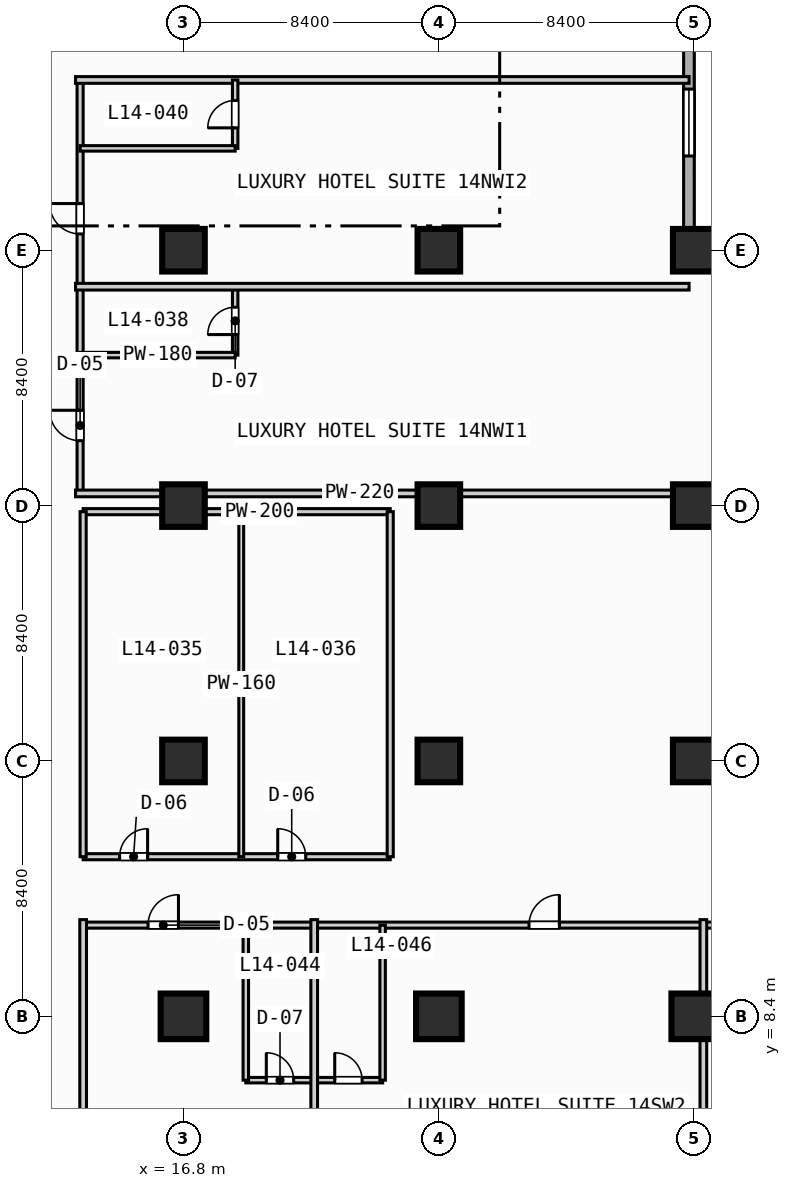
"""IFC4 building model, lengths in metres.
Left out: names, types, materials, properties, quantities, classifications, styles, units other than length and angle.
Written with IfcOpenShell. Run it as: python <this file> out.ifc"""

import sys

from ifc_helpers import new_model, si_unit, direction, frame, frame_2d, origin, origin_2d, place, context, subcontext, project, spatial, rectangle, extrude, element, fill, save


model = new_model("IFC4")
c1 = context("Model", 3, precision=1e-05, world=origin(), true_north=direction((0.0, 1.0)))
c2 = subcontext(c1, "Body", "Model", "MODEL_VIEW")
j1 = project(units=[si_unit("LENGTHUNIT", "METRE"), si_unit("PLANEANGLEUNIT", "RADIAN")], contexts=[c1])
p1 = place(None, origin())
s1 = spatial("IfcSite", under=j1, at=p1, CompositionType="ELEMENT")
p2 = place(p1, origin())
s2 = spatial("IfcBuilding", under=s1, at=p2, CompositionType="ELEMENT")
p3 = place(p2, frame((0.0, 0.0, 62.4)))
s3 = spatial("IfcBuildingStorey", under=s2, at=p3, CompositionType="ELEMENT", Elevation=62.4)
p4 = place(p3, frame((16.8, 8.4, 0.0), z_axis=(0.0, 0.0, 1.0), x_axis=(1.0, 0.0, 0.0)))
e1 = element("IfcColumn", 1, at=p4, inside=s3, PredefinedType="COLUMN", context=c2, shape_type="SweptSolid", body=[
    extrude(rectangle(XDim=1.5, YDim=1.5, at=origin_2d()), origin(), (0.0, 0.0, 1.0), 3.8),
])
for number, where, z_axis, x_axis in (
    (2, (16.8, 16.8, 0.0), (0.0, 0.0, 1.0), (1.0, 0.0, 0.0)),
    (3, (16.8, 25.2, 0.0), (0.0, 0.0, 1.0), (1.0, 0.0, 0.0)),
    (4, (16.8, 33.6, 0.0), (0.0, 0.0, 1.0), (1.0, 0.0, 0.0)),
):
    element("IfcColumn", number, at=place(p3, frame(where, z_axis=z_axis, x_axis=x_axis)), inside=s3, PredefinedType="COLUMN", context=c2, shape_type="SweptSolid", body=[
        extrude(rectangle(XDim=1.4, YDim=1.4, at=origin_2d()), origin(), (0.0, 0.0, 1.0), 3.8),
    ])
p5 = place(p3, frame((25.2, 8.4, 0.0), z_axis=(0.0, 0.0, 1.0), x_axis=(1.0, 0.0, 0.0)))
e5 = element("IfcColumn", 5, at=p5, inside=s3, PredefinedType="COLUMN", context=c2, shape_type="SweptSolid", body=[
    extrude(rectangle(XDim=1.5, YDim=1.5, at=origin_2d()), origin(), (0.0, 0.0, 1.0), 3.8),
])
for number, where, z_axis, x_axis in (
    (6, (25.2, 16.8, 0.0), (0.0, 0.0, 1.0), (1.0, 0.0, 0.0)),
    (7, (25.2, 25.2, 0.0), (0.0, 0.0, 1.0), (1.0, 0.0, 0.0)),
    (8, (25.2, 33.6, 0.0), (0.0, 0.0, 1.0), (1.0, 0.0, 0.0)),
):
    element("IfcColumn", number, at=place(p3, frame(where, z_axis=z_axis, x_axis=x_axis)), inside=s3, PredefinedType="COLUMN", context=c2, shape_type="SweptSolid", body=[
        extrude(rectangle(XDim=1.4, YDim=1.4, at=origin_2d()), origin(), (0.0, 0.0, 1.0), 3.8),
    ])
p6 = place(p3, frame((33.6, 8.4, 0.0), z_axis=(0.0, 0.0, 1.0), x_axis=(1.0, 0.0, 0.0)))
e9 = element("IfcColumn", 9, at=p6, inside=s3, PredefinedType="COLUMN", context=c2, shape_type="SweptSolid", body=[
    extrude(rectangle(XDim=1.5, YDim=1.5, at=origin_2d()), origin(), (0.0, 0.0, 1.0), 3.8),
])
for number, where, z_axis, x_axis in (
    (10, (33.6, 16.8, 0.0), (0.0, 0.0, 1.0), (1.0, 0.0, 0.0)),
    (11, (33.6, 25.2, 0.0), (0.0, 0.0, 1.0), (1.0, 0.0, 0.0)),
    (12, (33.6, 33.6, 0.0), (0.0, 0.0, 1.0), (1.0, 0.0, 0.0)),
):
    element("IfcColumn", number, at=place(p3, frame(where, z_axis=z_axis, x_axis=x_axis)), inside=s3, PredefinedType="COLUMN", context=c2, shape_type="SweptSolid", body=[
        extrude(rectangle(XDim=1.4, YDim=1.4, at=origin_2d()), origin(), (0.0, 0.0, 1.0), 3.8),
    ])
p7 = place(p3, frame((33.425, 89.225, 0.0), z_axis=(0.0, 0.0, 1.0), x_axis=(0.0, -1.0, 0.0)))
e13 = element("IfcWall", 13, at=p7, inside=s3, PredefinedType="STANDARD", context=c2, shape_type="SweptSolid", body=[
    extrude(rectangle(XDim=55.8, YDim=0.35, at=frame_2d((27.9, 0.0))), origin(), (0.0, 0.0, 1.0), 3.55),
])
p8 = place(p7, frame((50.325, 0.0, 0.85)))
e14 = element("IfcOpeningElement", 14, at=p8, cuts=e13, PredefinedType="OPENING", context=c2, shape_type="SweptSolid", body=[
    extrude(rectangle(XDim=2.2, YDim=1.8, at=frame_2d((1.1, 0.9))), frame((0.0, 0.185, 0.0), z_axis=(0.0, -1.0, 0.0), x_axis=(1.0, 0.0, 0.0)), (0.0, 0.0, 1.0), 0.37),
])
p9 = place(p3, frame((33.425, 33.425, 0.0), z_axis=(0.0, 0.0, 1.0), x_axis=(1.0, 0.0, 0.0)))
e15 = element("IfcWall", 15, at=p9, inside=s3, PredefinedType="STANDARD", context=c2, shape_type="SweptSolid", body=[
    extrude(rectangle(XDim=55.8, YDim=0.35, at=frame_2d((27.9, 0.0))), origin(), (0.0, 0.0, 1.0), 3.55),
])
p10 = place(p9, frame((12.075, 0.0, 0.0)))
e16 = element("IfcOpeningElement", 16, at=p10, cuts=e15, PredefinedType="OPENING", context=c2, shape_type="SweptSolid", body=[
    extrude(rectangle(XDim=1.4, YDim=2.2, at=frame_2d((0.7, 1.1))), frame((0.0, 0.185, 0.0), z_axis=(0.0, -1.0, 0.0), x_axis=(1.0, 0.0, 0.0)), (0.0, 0.0, 1.0), 0.37),
])
p11 = place(p9, frame((36.875, 0.0, 0.85)))
e17 = element("IfcOpeningElement", 17, at=p11, cuts=e15, PredefinedType="OPENING", context=c2, shape_type="SweptSolid", body=[
    extrude(rectangle(XDim=2.2, YDim=1.8, at=frame_2d((1.1, 0.9))), frame((0.0, 0.185, 0.0), z_axis=(0.0, -1.0, 0.0), x_axis=(1.0, 0.0, 0.0)), (0.0, 0.0, 1.0), 0.37),
])
p12 = place(p9, frame((45.275, 0.0, 0.85)))
e18 = element("IfcOpeningElement", 18, at=p12, cuts=e15, PredefinedType="OPENING", context=c2, shape_type="SweptSolid", body=[
    extrude(rectangle(XDim=2.2, YDim=1.8, at=frame_2d((1.1, 0.9))), frame((0.0, 0.185, 0.0), z_axis=(0.0, -1.0, 0.0), x_axis=(1.0, 0.0, 0.0)), (0.0, 0.0, 1.0), 0.37),
])
p13 = place(p3, frame((13.5, 13.65, 0.0), z_axis=(0.0, 0.0, 1.0), x_axis=(1.0, 0.0, 0.0)))
e19 = element("IfcWall", 19, at=p13, inside=s3, PredefinedType="PARTITIONING", context=c2, shape_type="SweptSolid", body=[
    extrude(rectangle(XDim=10.1, YDim=0.2, at=frame_2d((5.05, 0.0))), origin(), (0.0, 0.0, 1.0), 3.55),
])
p14 = place(p13, frame((1.2, 0.0, 0.0)))
e20 = element("IfcOpeningElement", 20, at=p14, cuts=e19, PredefinedType="OPENING", context=c2, shape_type="SweptSolid", body=[
    extrude(rectangle(XDim=0.92, YDim=2.1, at=frame_2d((0.46, 1.05))), frame((0.0, 0.11, 0.0), z_axis=(0.0, -1.0, 0.0), x_axis=(1.0, 0.0, 0.0)), (0.0, 0.0, 1.0), 0.22),
])
p15 = place(p13, frame((6.4, 0.0, 0.0)))
e21 = element("IfcOpeningElement", 21, at=p15, cuts=e19, PredefinedType="OPENING", context=c2, shape_type="SweptSolid", body=[
    extrude(rectangle(XDim=0.92, YDim=2.1, at=frame_2d((0.46, 1.05))), frame((0.0, 0.11, 0.0), z_axis=(0.0, -1.0, 0.0), x_axis=(1.0, 0.0, 0.0)), (0.0, 0.0, 1.0), 0.22),
])
p16 = place(p3, frame((18.7, 13.65, 0.0), z_axis=(0.0, 0.0, 1.0), x_axis=(0.0, 1.0, 0.0)))
e22 = element("IfcWall", 22, at=p16, inside=s3, PredefinedType="PARTITIONING", context=c2, shape_type="SweptSolid", body=[
    extrude(rectangle(XDim=11.35, YDim=0.16, at=frame_2d((5.675, 0.0))), origin(), (0.0, 0.0, 1.0), 3.55),
])
p17 = place(p3, frame((13.5, 25.0, 0.0), z_axis=(0.0, 0.0, 1.0), x_axis=(1.0, 0.0, 0.0)))
e23 = element("IfcWall", 23, at=p17, inside=s3, PredefinedType="PARTITIONING", context=c2, shape_type="SweptSolid", body=[
    extrude(rectangle(XDim=10.1, YDim=0.2, at=frame_2d((5.05, 0.0))), origin(), (0.0, 0.0, 1.0), 2.8),
])
for number, where, z_axis, x_axis in (
    (24, (13.5, 13.65, 0.0), (0.0, 0.0, 1.0), (0.0, 1.0, 0.0)),
    (25, (23.6, 13.65, 0.0), (0.0, 0.0, 1.0), (0.0, 1.0, 0.0)),
):
    element("IfcWall", number, at=place(p3, frame(where, z_axis=z_axis, x_axis=x_axis)), inside=s3, PredefinedType="PARTITIONING", context=c2, shape_type="SweptSolid", body=[
        extrude(rectangle(XDim=11.35, YDim=0.2, at=frame_2d((5.675, 0.0))), origin(), (0.0, 0.0, 1.0), 3.55),
    ])
p18 = place(p3, frame((13.4, 25.6, 0.0), z_axis=(0.0, 0.0, 1.0), x_axis=(0.0, 1.0, 0.0)))
e26 = element("IfcWall", 26, at=p18, inside=s3, PredefinedType="PARTITIONING", context=c2, shape_type="SweptSolid", body=[
    extrude(rectangle(XDim=13.6, YDim=0.2, at=frame_2d((6.8, 0.0))), origin(), (0.0, 0.0, 1.0), 3.55),
])
p19 = place(p18, frame((1.735, 0.0, 0.0)))
e27 = element("IfcOpeningElement", 27, at=p19, cuts=e26, PredefinedType="OPENING", context=c2, shape_type="SweptSolid", body=[
    extrude(rectangle(XDim=1.0, YDim=2.15, at=frame_2d((0.5, 1.075))), frame((0.0, 0.11, 0.0), z_axis=(0.0, -1.0, 0.0), x_axis=(1.0, 0.0, 0.0)), (0.0, 0.0, 1.0), 0.22),
])
p20 = place(p18, frame((8.535, 0.0, 0.0)))
e28 = element("IfcOpeningElement", 28, at=p20, cuts=e26, PredefinedType="OPENING", context=c2, shape_type="SweptSolid", body=[
    extrude(rectangle(XDim=1.0, YDim=2.15, at=frame_2d((0.5, 1.075))), frame((0.0, 0.11, 0.0), z_axis=(0.0, -1.0, 0.0), x_axis=(1.0, 0.0, 0.0)), (0.0, 0.0, 1.0), 0.22),
])
p21 = place(p3, frame((13.25, 25.6, 0.0), z_axis=(0.0, 0.0, 1.0), x_axis=(1.0, 0.0, 0.0)))
e29 = element("IfcWall", 29, at=p21, inside=s3, PredefinedType="PARTITIONING", context=c2, shape_type="SweptSolid", body=[
    extrude(rectangle(XDim=20.18, YDim=0.22, at=frame_2d((10.09, 0.0))), origin(), (0.0, 0.0, 1.0), 3.55),
])
p22 = place(p3, frame((18.5, 30.15, 0.0), z_axis=(0.0, 0.0, 1.0), x_axis=(0.0, 1.0, 0.0)))
e30 = element("IfcWall", 30, at=p22, inside=s3, PredefinedType="PLUMBINGWALL", context=c2, shape_type="SweptSolid", body=[
    extrude(rectangle(XDim=2.25, YDim=0.18, at=frame_2d((1.125, 0.0))), origin(), (0.0, 0.0, 1.0), 3.55),
])
p23 = place(p22, frame((0.675, 0.0, 0.0)))
e31 = element("IfcOpeningElement", 31, at=p23, cuts=e30, PredefinedType="OPENING", context=c2, shape_type="SweptSolid", body=[
    extrude(rectangle(XDim=0.9, YDim=2.1, at=frame_2d((0.45, 1.05))), frame((0.0, 0.1, 0.0), z_axis=(0.0, -1.0, 0.0), x_axis=(1.0, 0.0, 0.0)), (0.0, 0.0, 1.0), 0.2),
])
p24 = place(p3, frame((13.4, 30.15, 0.0), z_axis=(0.0, 0.0, 1.0), x_axis=(1.0, 0.0, 0.0)))
e32 = element("IfcWall", 32, at=p24, inside=s3, PredefinedType="PLUMBINGWALL", context=c2, shape_type="SweptSolid", body=[
    extrude(rectangle(XDim=5.1, YDim=0.18, at=frame_2d((2.55, 0.0))), origin(), (0.0, 0.0, 1.0), 3.55),
])
for number, where, z_axis, x_axis in (
    (33, (13.25, 32.4, 0.0), (0.0, 0.0, 1.0), (1.0, 0.0, 0.0)),
    (34, (13.25, 39.2, 0.0), (0.0, 0.0, 1.0), (1.0, 0.0, 0.0)),
):
    element("IfcWall", number, at=place(p3, frame(where, z_axis=z_axis, x_axis=x_axis)), inside=s3, PredefinedType="PARTITIONING", context=c2, shape_type="SweptSolid", body=[
        extrude(rectangle(XDim=20.18, YDim=0.22, at=frame_2d((10.09, 0.0))), origin(), (0.0, 0.0, 1.0), 3.55),
    ])
p25 = place(p3, frame((18.5, 36.95, 0.0), z_axis=(0.0, 0.0, 1.0), x_axis=(0.0, 1.0, 0.0)))
e35 = element("IfcWall", 35, at=p25, inside=s3, PredefinedType="PLUMBINGWALL", context=c2, shape_type="SweptSolid", body=[
    extrude(rectangle(XDim=2.25, YDim=0.18, at=frame_2d((1.125, 0.0))), origin(), (0.0, 0.0, 1.0), 3.55),
])
p26 = place(p25, frame((0.675, 0.0, 0.0)))
e36 = element("IfcOpeningElement", 36, at=p26, cuts=e35, PredefinedType="OPENING", context=c2, shape_type="SweptSolid", body=[
    extrude(rectangle(XDim=0.9, YDim=2.1, at=frame_2d((0.45, 1.05))), frame((0.0, 0.1, 0.0), z_axis=(0.0, -1.0, 0.0), x_axis=(1.0, 0.0, 0.0)), (0.0, 0.0, 1.0), 0.2),
])
p27 = place(p3, frame((13.4, 36.95, 0.0), z_axis=(0.0, 0.0, 1.0), x_axis=(1.0, 0.0, 0.0)))
e37 = element("IfcWall", 37, at=p27, inside=s3, PredefinedType="PLUMBINGWALL", context=c2, shape_type="SweptSolid", body=[
    extrude(rectangle(XDim=5.1, YDim=0.18, at=frame_2d((2.55, 0.0))), origin(), (0.0, 0.0, 1.0), 3.55),
])
p28 = place(p3, frame((13.5, 11.4, 0.0), z_axis=(0.0, 0.0, 1.0), x_axis=(1.0, 0.0, 0.0)))
e38 = element("IfcWall", 38, at=p28, inside=s3, PredefinedType="PARTITIONING", context=c2, shape_type="SweptSolid", body=[
    extrude(rectangle(XDim=50.3, YDim=0.2, at=frame_2d((25.15, 0.0))), origin(), (0.0, 0.0, 1.0), 3.55),
])
p29 = place(p28, frame((2.135, 0.0, 0.0)))
e39 = element("IfcOpeningElement", 39, at=p29, cuts=e38, PredefinedType="OPENING", context=c2, shape_type="SweptSolid", body=[
    extrude(rectangle(XDim=1.0, YDim=2.15, at=frame_2d((0.5, 1.075))), frame((0.0, 0.11, 0.0), z_axis=(0.0, -1.0, 0.0), x_axis=(1.0, 0.0, 0.0)), (0.0, 0.0, 1.0), 0.22),
])
p30 = place(p28, frame((14.665, 0.0, 0.0)))
e40 = element("IfcOpeningElement", 40, at=p30, cuts=e38, PredefinedType="OPENING", context=c2, shape_type="SweptSolid", body=[
    extrude(rectangle(XDim=1.0, YDim=2.15, at=frame_2d((0.5, 1.075))), frame((0.0, 0.11, 0.0), z_axis=(0.0, -1.0, 0.0), x_axis=(1.0, 0.0, 0.0)), (0.0, 0.0, 1.0), 0.22),
])
p31 = place(p28, frame((22.31, 0.0, 0.0)))
e41 = element("IfcOpeningElement", 41, at=p31, cuts=e38, PredefinedType="OPENING", context=c2, shape_type="SweptSolid", body=[
    extrude(rectangle(XDim=1.0, YDim=2.15, at=frame_2d((0.5, 1.075))), frame((0.0, 0.11, 0.0), z_axis=(0.0, -1.0, 0.0), x_axis=(1.0, 0.0, 0.0)), (0.0, 0.0, 1.0), 0.22),
])
p32 = place(p28, frame((32.51, 0.0, 0.0)))
e42 = element("IfcOpeningElement", 42, at=p32, cuts=e38, PredefinedType="OPENING", context=c2, shape_type="SweptSolid", body=[
    extrude(rectangle(XDim=1.0, YDim=2.15, at=frame_2d((0.5, 1.075))), frame((0.0, 0.11, 0.0), z_axis=(0.0, -1.0, 0.0), x_axis=(1.0, 0.0, 0.0)), (0.0, 0.0, 1.0), 0.22),
])
p33 = place(p28, frame((43.885, 0.0, 0.0)))
e43 = element("IfcOpeningElement", 43, at=p33, cuts=e38, PredefinedType="OPENING", context=c2, shape_type="SweptSolid", body=[
    extrude(rectangle(XDim=1.0, YDim=2.15, at=frame_2d((0.5, 1.075))), frame((0.0, 0.11, 0.0), z_axis=(0.0, -1.0, 0.0), x_axis=(1.0, 0.0, 0.0)), (0.0, 0.0, 1.0), 0.22),
])
p34 = place(p3, frame((13.5, 0.2, 0.0), z_axis=(0.0, 0.0, 1.0), x_axis=(0.0, 1.0, 0.0)))
e44 = element("IfcWall", 44, at=p34, inside=s3, PredefinedType="PARTITIONING", context=c2, shape_type="SweptSolid", body=[
    extrude(rectangle(XDim=11.38, YDim=0.22, at=frame_2d((5.69, 0.0))), origin(), (0.0, 0.0, 1.0), 3.55),
])
p35 = place(p3, frame((18.85, 6.3, 0.0), z_axis=(0.0, 0.0, 1.0), x_axis=(1.0, 0.0, 0.0)))
e45 = element("IfcWall", 45, at=p35, inside=s3, PredefinedType="PLUMBINGWALL", context=c2, shape_type="SweptSolid", body=[
    extrude(rectangle(XDim=4.5, YDim=0.18, at=frame_2d((2.25, 0.0))), origin(), (0.0, 0.0, 1.0), 3.55),
])
p36 = place(p35, frame((0.675, 0.0, 0.0)))
e46 = element("IfcOpeningElement", 46, at=p36, cuts=e45, PredefinedType="OPENING", context=c2, shape_type="SweptSolid", body=[
    extrude(rectangle(XDim=0.9, YDim=2.1, at=frame_2d((0.45, 1.05))), frame((0.0, 0.1, 0.0), z_axis=(0.0, -1.0, 0.0), x_axis=(1.0, 0.0, 0.0)), (0.0, 0.0, 1.0), 0.2),
])
p37 = place(p35, frame((2.925, 0.0, 0.0)))
e47 = element("IfcOpeningElement", 47, at=p37, cuts=e45, PredefinedType="OPENING", context=c2, shape_type="SweptSolid", body=[
    extrude(rectangle(XDim=0.9, YDim=2.1, at=frame_2d((0.45, 1.05))), frame((0.0, 0.1, 0.0), z_axis=(0.0, -1.0, 0.0), x_axis=(1.0, 0.0, 0.0)), (0.0, 0.0, 1.0), 0.2),
])
p38 = place(p3, frame((18.85, 6.3, 0.0), z_axis=(0.0, 0.0, 1.0), x_axis=(0.0, 1.0, 0.0)))
e48 = element("IfcWall", 48, at=p38, inside=s3, PredefinedType="PLUMBINGWALL", context=c2, shape_type="SweptSolid", body=[
    extrude(rectangle(XDim=5.1, YDim=0.18, at=frame_2d((2.55, 0.0))), origin(), (0.0, 0.0, 1.0), 3.55),
])
p39 = place(p3, frame((21.1, 0.2, 0.0), z_axis=(0.0, 0.0, 1.0), x_axis=(0.0, 1.0, 0.0)))
e49 = element("IfcWall", 49, at=p39, inside=s3, PredefinedType="PARTITIONING", context=c2, shape_type="SweptSolid", body=[
    extrude(rectangle(XDim=11.38, YDim=0.22, at=frame_2d((5.69, 0.0))), origin(), (0.0, 0.0, 1.0), 3.55),
])
p40 = place(p3, frame((23.35, 6.3, 0.0), z_axis=(0.0, 0.0, 1.0), x_axis=(0.0, 1.0, 0.0)))
e50 = element("IfcWall", 50, at=p40, inside=s3, PredefinedType="PLUMBINGWALL", context=c2, shape_type="SweptSolid", body=[
    extrude(rectangle(XDim=5.1, YDim=0.18, at=frame_2d((2.55, 0.0))), origin(), (0.0, 0.0, 1.0), 3.55),
])
p41 = place(p3, frame((33.9, 0.2, 0.0), z_axis=(0.0, 0.0, 1.0), x_axis=(0.0, 1.0, 0.0)))
e51 = element("IfcWall", 51, at=p41, inside=s3, PredefinedType="PARTITIONING", context=c2, shape_type="SweptSolid", body=[
    extrude(rectangle(XDim=11.38, YDim=0.22, at=frame_2d((5.69, 0.0))), origin(), (0.0, 0.0, 1.0), 2.8),
])
p42 = place(p8, origin())
e52 = element("IfcWindow", 52, at=p42, inside=s3, PartitioningType="SINGLE_PANEL", PredefinedType="WINDOW", context=c2, shape_type="SweptSolid", body=[
    extrude(rectangle(XDim=2.2, YDim=1.8, at=frame_2d((1.1, 0.9))), frame((0.0, 0.03, 0.0), z_axis=(0.0, -1.0, 0.0), x_axis=(1.0, 0.0, 0.0)), (0.0, 0.0, 1.0), 0.06),
])
fill(e14, e52)
p43 = place(p14, origin())
e53 = element("IfcDoor", 53, at=p43, inside=s3, OperationType="SINGLE_SWING_RIGHT", PredefinedType="DOOR", context=c2, shape_type="SweptSolid", body=[
    extrude(rectangle(XDim=0.92, YDim=2.1, at=frame_2d((0.46, 1.05))), frame((0.0, 0.025, 0.0), z_axis=(0.0, -1.0, 0.0), x_axis=(1.0, 0.0, 0.0)), (0.0, 0.0, 1.0), 0.05),
])
fill(e20, e53)
p44 = place(p15, origin())
e54 = element("IfcDoor", 54, at=p44, inside=s3, OperationType="SINGLE_SWING_LEFT", PredefinedType="DOOR", context=c2, shape_type="SweptSolid", body=[
    extrude(rectangle(XDim=0.92, YDim=2.1, at=frame_2d((0.46, 1.05))), frame((0.0, 0.025, 0.0), z_axis=(0.0, -1.0, 0.0), x_axis=(1.0, 0.0, 0.0)), (0.0, 0.0, 1.0), 0.05),
])
fill(e21, e54)
p45 = place(p19, origin())
e55 = element("IfcDoor", 55, at=p45, inside=s3, OperationType="SINGLE_SWING_RIGHT", PredefinedType="DOOR", context=c2, shape_type="SweptSolid", body=[
    extrude(rectangle(XDim=1.0, YDim=2.15, at=frame_2d((0.5, 1.075))), frame((0.0, 0.025, 0.0), z_axis=(0.0, -1.0, 0.0), x_axis=(1.0, 0.0, 0.0)), (0.0, 0.0, 1.0), 0.05),
])
fill(e27, e55)
p46 = place(p20, origin())
e56 = element("IfcDoor", 56, at=p46, inside=s3, OperationType="SINGLE_SWING_RIGHT", PredefinedType="DOOR", context=c2, shape_type="SweptSolid", body=[
    extrude(rectangle(XDim=1.0, YDim=2.15, at=frame_2d((0.5, 1.075))), frame((0.0, 0.025, 0.0), z_axis=(0.0, -1.0, 0.0), x_axis=(1.0, 0.0, 0.0)), (0.0, 0.0, 1.0), 0.05),
])
fill(e28, e56)
p47 = place(p23, origin())
e57 = element("IfcDoor", 57, at=p47, inside=s3, OperationType="SINGLE_SWING_LEFT", PredefinedType="DOOR", context=c2, shape_type="SweptSolid", body=[
    extrude(rectangle(XDim=0.9, YDim=2.1, at=frame_2d((0.45, 1.05))), frame((0.0, 0.025, 0.0), z_axis=(0.0, -1.0, 0.0), x_axis=(1.0, 0.0, 0.0)), (0.0, 0.0, 1.0), 0.05),
])
fill(e31, e57)
p48 = place(p26, origin())
e58 = element("IfcDoor", 58, at=p48, inside=s3, OperationType="SINGLE_SWING_LEFT", PredefinedType="DOOR", context=c2, shape_type="SweptSolid", body=[
    extrude(rectangle(XDim=0.9, YDim=2.1, at=frame_2d((0.45, 1.05))), frame((0.0, 0.025, 0.0), z_axis=(0.0, -1.0, 0.0), x_axis=(1.0, 0.0, 0.0)), (0.0, 0.0, 1.0), 0.05),
])
fill(e36, e58)
p49 = place(p29, origin())
e59 = element("IfcDoor", 59, at=p49, inside=s3, OperationType="SINGLE_SWING_RIGHT", PredefinedType="DOOR", context=c2, shape_type="SweptSolid", body=[
    extrude(rectangle(XDim=1.0, YDim=2.15, at=frame_2d((0.5, 1.075))), frame((0.0, 0.025, 0.0), z_axis=(0.0, -1.0, 0.0), x_axis=(1.0, 0.0, 0.0)), (0.0, 0.0, 1.0), 0.05),
])
fill(e39, e59)
p50 = place(p30, origin())
e60 = element("IfcDoor", 60, at=p50, inside=s3, OperationType="SINGLE_SWING_RIGHT", PredefinedType="DOOR", context=c2, shape_type="SweptSolid", body=[
    extrude(rectangle(XDim=1.0, YDim=2.15, at=frame_2d((0.5, 1.075))), frame((0.0, 0.025, 0.0), z_axis=(0.0, -1.0, 0.0), x_axis=(1.0, 0.0, 0.0)), (0.0, 0.0, 1.0), 0.05),
])
fill(e40, e60)
p51 = place(p36, origin())
e61 = element("IfcDoor", 61, at=p51, inside=s3, OperationType="SINGLE_SWING_LEFT", PredefinedType="DOOR", context=c2, shape_type="SweptSolid", body=[
    extrude(rectangle(XDim=0.9, YDim=2.1, at=frame_2d((0.45, 1.05))), frame((0.0, 0.025, 0.0), z_axis=(0.0, -1.0, 0.0), x_axis=(1.0, 0.0, 0.0)), (0.0, 0.0, 1.0), 0.05),
])
fill(e46, e61)
p52 = place(p37, origin())
e62 = element("IfcDoor", 62, at=p52, inside=s3, OperationType="SINGLE_SWING_LEFT", PredefinedType="DOOR", context=c2, shape_type="SweptSolid", body=[
    extrude(rectangle(XDim=0.9, YDim=2.1, at=frame_2d((0.45, 1.05))), frame((0.0, 0.025, 0.0), z_axis=(0.0, -1.0, 0.0), x_axis=(1.0, 0.0, 0.0)), (0.0, 0.0, 1.0), 0.05),
])
fill(e47, e62)
save(model, sys.argv[1])
